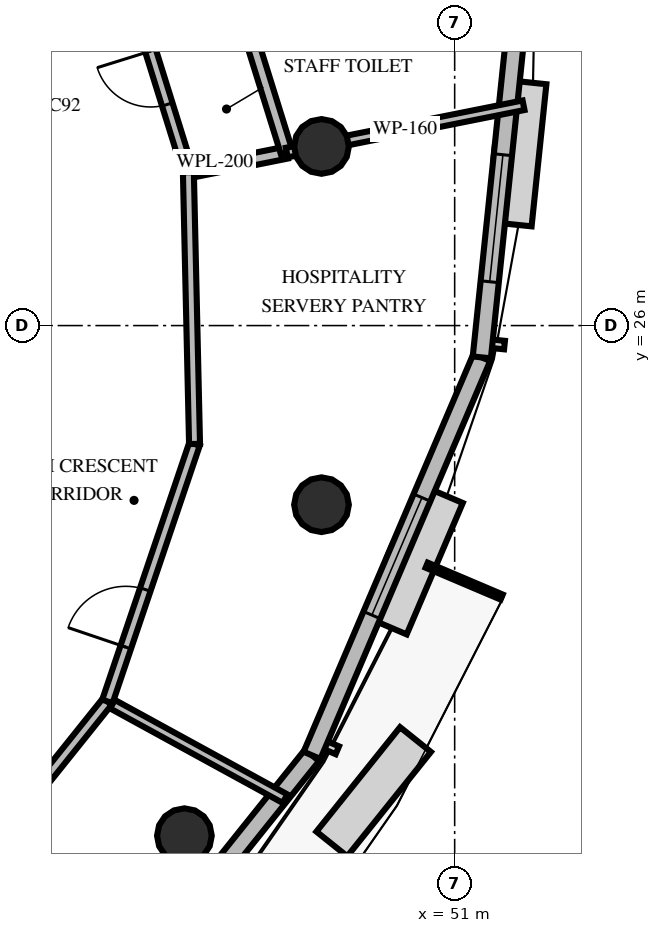
"""IFC4 building model, lengths in metres.
Left out: names, types, materials, properties, quantities, classifications, styles, units other than length and angle.
Written with IfcOpenShell. Run it as: python <this file> out.ifc"""

import sys

from ifc_helpers import new_model, si_unit, direction, frame, frame_2d, origin, origin_2d, place, context, subcontext, project, spatial, rectangle, circle, extrude, element, fill, save


model = new_model("IFC4")
c1 = context("Model", 3, precision=1e-05, world=origin(), true_north=direction((0.0, 1.0)))
c2 = subcontext(c1, "Body", "Model", "MODEL_VIEW")
j1 = project(units=[si_unit("LENGTHUNIT", "METRE"), si_unit("PLANEANGLEUNIT", "RADIAN")], contexts=[c1])
p1 = place(None, origin())
s1 = spatial("IfcSite", under=j1, at=p1, CompositionType="ELEMENT")
p2 = place(p1, origin())
s2 = spatial("IfcBuilding", under=s1, at=p2, CompositionType="ELEMENT")
p3 = place(p2, frame((0.0, 0.0, 244.8)))
s3 = spatial("IfcBuildingStorey", under=s2, at=p3, CompositionType="ELEMENT", Elevation=244.8)
for number, where, z_axis, x_axis in (
    (1, (48.81, 28.946, 0.0), (0.0, 0.0, 1.0), (1.0, 0.0, 0.0)),
    (2, (46.555, 17.611, 0.0), (0.0, 0.0, 1.0), (1.0, 0.0, 0.0)),
    (3, (48.81, 23.054, 0.0), (0.0, 0.0, 1.0), (1.0, 0.0, 0.0)),
):
    element("IfcColumn", number, at=place(p3, frame(where, z_axis=z_axis, x_axis=x_axis)), inside=s3, PredefinedType="COLUMN", context=c2, shape_type="SweptSolid", body=[
        extrude(circle(Radius=0.45, at=origin_2d()), origin(), (0.0, 0.0, 1.0), 3.6),
    ])
p4 = place(p3, frame((44.094, 13.24, 0.0), z_axis=(0.0, 0.0, 1.0), x_axis=(0.625225587143, 0.780444082034, 0.0)))
e4 = element("IfcWall", 4, at=p4, inside=s3, PredefinedType="SOLIDWALL", context=c2, shape_type="SweptSolid", body=[
    extrude(rectangle(XDim=7.293, YDim=0.3, at=frame_2d((3.647, 0.0))), origin(), (0.0, 0.0, 1.0), 2.76),
])
p5 = place(p4, frame((1.39, 0.0, 0.0)))
e5 = element("IfcOpeningElement", 5, at=p5, cuts=e4, PredefinedType="OPENING", context=c2, shape_type="SweptSolid", body=[
    extrude(rectangle(XDim=1.05, YDim=2.15, at=frame_2d((0.525, 1.075))), frame((0.0, 0.16, 0.0), z_axis=(0.0, -1.0, 0.0), x_axis=(1.0, 0.0, 0.0)), (0.0, 0.0, 1.0), 0.32),
])
p6 = place(p3, frame((48.654, 18.933, 0.0), z_axis=(0.0, 0.0, 1.0), x_axis=(0.392473519116, 0.919763304765, 0.0)))
e6 = element("IfcWall", 6, at=p6, inside=s3, PredefinedType="SOLIDWALL", context=c2, shape_type="SweptSolid", body=[
    extrude(rectangle(XDim=7.115, YDim=0.3, at=frame_2d((3.558, 0.0))), origin(), (0.0, 0.0, 1.0), 2.76),
])
p7 = place(p6, frame((2.508, 0.0, 0.8)))
e7 = element("IfcOpeningElement", 7, at=p7, cuts=e6, PredefinedType="OPENING", context=c2, shape_type="SweptSolid", body=[
    extrude(rectangle(XDim=2.1, YDim=1.85, at=frame_2d((1.05, 0.925))), frame((0.0, 0.16, 0.0), z_axis=(0.0, -1.0, 0.0), x_axis=(1.0, 0.0, 0.0)), (0.0, 0.0, 1.0), 0.32),
])
p8 = place(p3, frame((51.447, 25.477, 0.0), z_axis=(0.0, 0.0, 1.0), x_axis=(0.103600024901, 0.994619040055, 0.0)))
e8 = element("IfcWall", 8, at=p8, inside=s3, PredefinedType="SOLIDWALL", context=c2, shape_type="SweptSolid", body=[
    extrude(rectangle(XDim=6.643, YDim=0.3, at=frame_2d((3.322, 0.0))), origin(), (0.0, 0.0, 1.0), 2.76),
])
p9 = place(p8, frame((1.251, 0.0, 0.8)))
e9 = element("IfcOpeningElement", 9, at=p9, cuts=e8, PredefinedType="OPENING", context=c2, shape_type="SweptSolid", body=[
    extrude(rectangle(XDim=2.1, YDim=1.85, at=frame_2d((1.05, 0.925))), frame((0.0, 0.16, 0.0), z_axis=(0.0, -1.0, 0.0), x_axis=(1.0, 0.0, 0.0)), (0.0, 0.0, 1.0), 0.32),
])
p10 = place(p3, frame((46.621, 28.522, 0.0), z_axis=(0.0, 0.0, 1.0), x_axis=(0.980592056288, 0.196059223567, 0.0)))
e10 = element("IfcWall", 10, at=p10, inside=s3, PredefinedType="PLUMBINGWALL", context=c2, shape_type="SweptSolid", body=[
    extrude(rectangle(XDim=1.65, YDim=0.2, at=frame_2d((0.825, 0.0))), origin(), (0.0, 0.0, 1.0), 2.46),
])
p11 = place(p3, frame((48.239, 28.845, 0.0), z_axis=(0.0, 0.0, 1.0), x_axis=(-0.29741851311, 0.954747206364, 0.0)))
e11 = element("IfcWall", 11, at=p11, inside=s3, PredefinedType="PLUMBINGWALL", context=c2, shape_type="SweptSolid", body=[
    extrude(rectangle(XDim=3.036, YDim=0.2, at=frame_2d((1.518, 0.0))), origin(), (0.0, 0.0, 1.0), 2.46),
])
p12 = place(p3, frame((46.621, 28.522, 0.0), z_axis=(0.0, 0.0, 1.0), x_axis=(-0.297412131429, 0.954749194333, 0.0)))
e12 = element("IfcWall", 12, at=p12, inside=s3, PredefinedType="PARTITIONING", context=c2, shape_type="SweptSolid", body=[
    extrude(rectangle(XDim=2.691, YDim=0.18, at=frame_2d((1.345, 0.0))), origin(), (0.0, 0.0, 1.0), 2.46),
])
p13 = place(p12, frame((1.167, 0.0, 0.0)))
e13 = element("IfcOpeningElement", 13, at=p13, cuts=e12, PredefinedType="OPENING", context=c2, shape_type="SweptSolid", body=[
    extrude(rectangle(XDim=0.92, YDim=2.1, at=frame_2d((0.46, 1.05))), frame((0.0, 0.1, 0.0), z_axis=(0.0, -1.0, 0.0), x_axis=(1.0, 0.0, 0.0)), (0.0, 0.0, 1.0), 0.2),
])
p14 = place(p3, frame((48.239, 28.845, 0.0), z_axis=(0.0, 0.0, 1.0), x_axis=(0.980618489402, 0.195926971709, 0.0)))
e14 = element("IfcWall", 14, at=p14, inside=s3, PredefinedType="PARTITIONING", context=c2, shape_type="SweptSolid", body=[
    extrude(rectangle(XDim=3.971, YDim=0.16, at=frame_2d((1.986, 0.0))), origin(), (0.0, 0.0, 1.0), 2.46),
])
p15 = place(p3, frame((45.289, 19.82, 0.0), z_axis=(0.0, 0.0, 1.0), x_axis=(0.877155073621, -0.480207222791, 0.0)))
e15 = element("IfcWall", 15, at=p15, inside=s3, PredefinedType="PARTITIONING", context=c2, shape_type="SweptSolid", body=[
    extrude(rectangle(XDim=3.331, YDim=0.16, at=frame_2d((1.666, 0.0))), origin(), (0.0, 0.0, 1.0), 2.46),
])
p16 = place(p3, frame((42.494, 16.331, 0.0), z_axis=(0.0, 0.0, 1.0), x_axis=(0.625247763114, 0.78042631601, 0.0)))
e16 = element("IfcWall", 16, at=p16, inside=s3, PredefinedType="PARTITIONING", context=c2, shape_type="SweptSolid", body=[
    extrude(rectangle(XDim=4.47, YDim=0.18, at=frame_2d((2.235, 0.0))), origin(), (0.0, 0.0, 1.0), 2.46),
])
p17 = place(p3, frame((45.289, 19.82, 0.0), z_axis=(0.0, 0.0, 1.0), x_axis=(0.320632364631, 0.947203719773, 0.0)))
e17 = element("IfcWall", 17, at=p17, inside=s3, PredefinedType="PARTITIONING", context=c2, shape_type="SweptSolid", body=[
    extrude(rectangle(XDim=4.47, YDim=0.18, at=frame_2d((2.235, 0.0))), origin(), (0.0, 0.0, 1.0), 2.46),
])
p18 = place(p17, frame((0.942, 0.0, 0.0)))
e18 = element("IfcOpeningElement", 18, at=p18, cuts=e17, PredefinedType="OPENING", context=c2, shape_type="SweptSolid", body=[
    extrude(rectangle(XDim=1.0, YDim=2.15, at=frame_2d((0.5, 1.075))), frame((0.0, 0.1, 0.0), z_axis=(0.0, -1.0, 0.0), x_axis=(1.0, 0.0, 0.0)), (0.0, 0.0, 1.0), 0.2),
])
p19 = place(p3, frame((46.722, 24.053, 0.0), z_axis=(0.0, 0.0, 1.0), x_axis=(-0.022668052471, 0.999743046686, 0.0)))
e19 = element("IfcWall", 19, at=p19, inside=s3, PredefinedType="PARTITIONING", context=c2, shape_type="SweptSolid", body=[
    extrude(rectangle(XDim=4.47, YDim=0.18, at=frame_2d((2.235, 0.0))), origin(), (0.0, 0.0, 1.0), 2.46),
])
p20 = place(p7, origin())
e20 = element("IfcWindow", 20, at=p20, inside=s3, PartitioningType="SINGLE_PANEL", PredefinedType="WINDOW", context=c2, shape_type="SweptSolid", body=[
    extrude(rectangle(XDim=2.1, YDim=1.85, at=frame_2d((1.05, 0.925))), frame((0.0, 0.03, 0.0), z_axis=(0.0, -1.0, 0.0), x_axis=(1.0, 0.0, 0.0)), (0.0, 0.0, 1.0), 0.06),
])
fill(e7, e20)
p21 = place(p9, origin())
e21 = element("IfcWindow", 21, at=p21, inside=s3, PartitioningType="SINGLE_PANEL", PredefinedType="WINDOW", context=c2, shape_type="SweptSolid", body=[
    extrude(rectangle(XDim=2.1, YDim=1.85, at=frame_2d((1.05, 0.925))), frame((0.0, 0.03, 0.0), z_axis=(0.0, -1.0, 0.0), x_axis=(1.0, 0.0, 0.0)), (0.0, 0.0, 1.0), 0.06),
])
fill(e9, e21)
p22 = place(p13, origin())
e22 = element("IfcDoor", 22, at=p22, inside=s3, OperationType="SINGLE_SWING_RIGHT", PredefinedType="DOOR", context=c2, shape_type="SweptSolid", body=[
    extrude(rectangle(XDim=0.92, YDim=2.1, at=frame_2d((0.46, 1.05))), frame((0.0, 0.025, 0.0), z_axis=(0.0, -1.0, 0.0), x_axis=(1.0, 0.0, 0.0)), (0.0, 0.0, 1.0), 0.05),
])
fill(e13, e22)
p23 = place(p18, origin())
e23 = element("IfcDoor", 23, at=p23, inside=s3, OperationType="SINGLE_SWING_LEFT", PredefinedType="DOOR", context=c2, shape_type="SweptSolid", body=[
    extrude(rectangle(XDim=1.0, YDim=2.15, at=frame_2d((0.5, 1.075))), frame((0.0, 0.025, 0.0), z_axis=(0.0, -1.0, 0.0), x_axis=(1.0, 0.0, 0.0)), (0.0, 0.0, 1.0), 0.05),
])
fill(e18, e23)
save(model, sys.argv[1])
